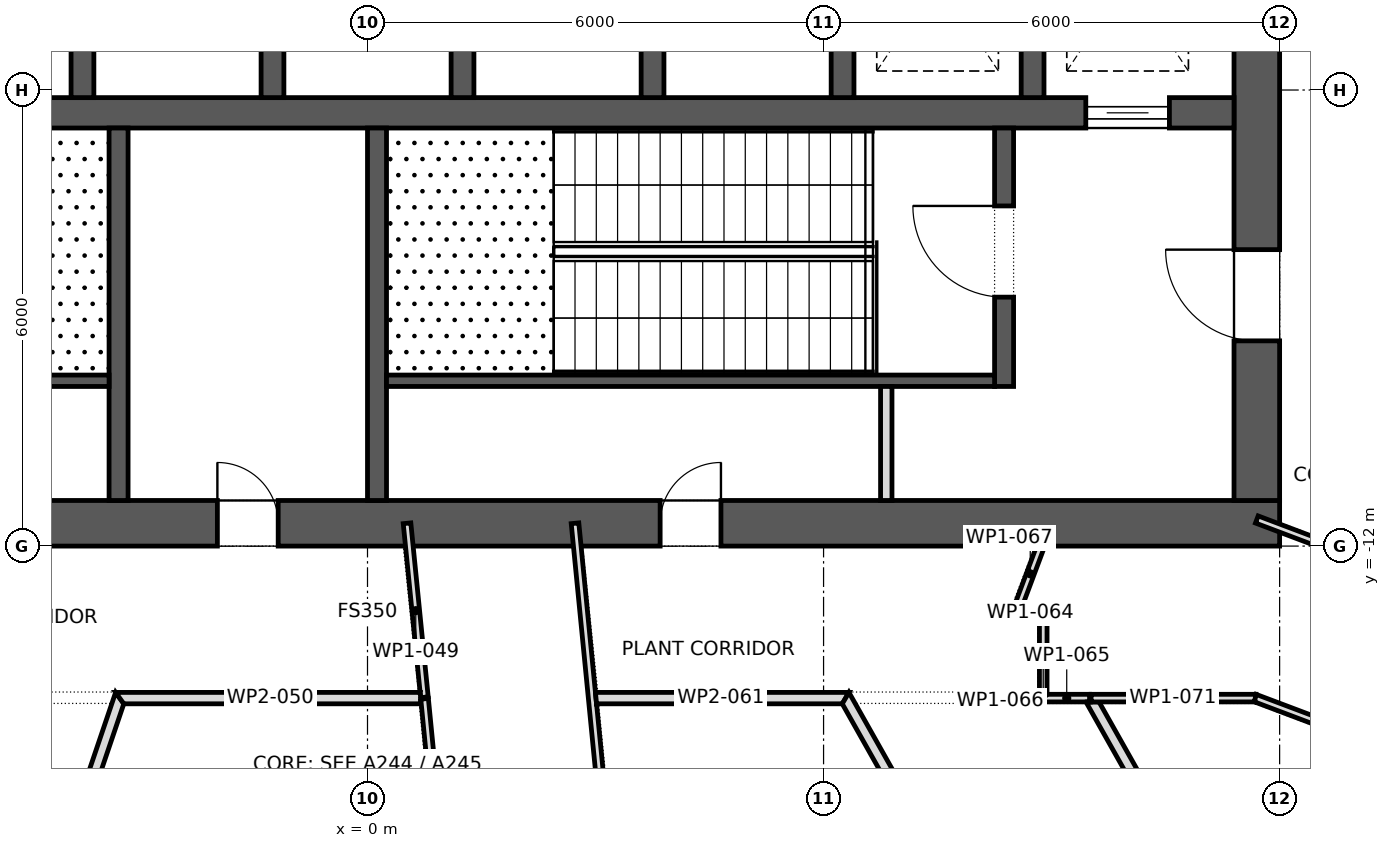
"""IFC4 building model, lengths in metres.
Left out: names, types, materials, properties, quantities, classifications, styles, units other than length and angle.
Written with IfcOpenShell. Run it as: python <this file> out.ifc"""

import sys

from ifc_helpers import new_model, si_unit, direction, frame, frame_2d, origin, place, context, subcontext, project, spatial, polyline, rectangle, outline, extrude, element, fill, save


model = new_model("IFC4")
c1 = context("Model", 3, precision=1e-05, world=origin(), true_north=direction((0.0, 1.0)))
c2 = subcontext(c1, "Body", "Model", "MODEL_VIEW")
j1 = project(units=[si_unit("LENGTHUNIT", "METRE"), si_unit("PLANEANGLEUNIT", "RADIAN")], contexts=[c1])
p1 = place(None, origin())
s1 = spatial("IfcSite", under=j1, at=p1, CompositionType="ELEMENT")
p2 = place(p1, origin())
s2 = spatial("IfcBuilding", under=s1, at=p2, CompositionType="ELEMENT")
p3 = place(p2, frame((0.0, 0.0, 173.5)))
s3 = spatial("IfcBuildingStorey", under=s2, at=p3, CompositionType="ELEMENT", Elevation=173.5)
p4 = place(p3, frame((-12.0, -11.7, 0.0), z_axis=(0.0, 0.0, 1.0), x_axis=(1.0, 0.0, 0.0)))
e1 = element("IfcWall", 1, at=p4, inside=s3, PredefinedType="SHEAR", context=c2, shape_type="SweptSolid", body=[
    extrude(rectangle(XDim=24.0, YDim=0.6, at=frame_2d((12.0, 0.0))), origin(), (0.0, 0.0, 1.0), 5.4),
])
p5 = place(p4, frame((10.025, 0.0, 0.0)))
e2 = element("IfcOpeningElement", 2, at=p5, cuts=e1, PredefinedType="OPENING", context=c2, shape_type="SweptSolid", body=[
    extrude(rectangle(XDim=0.8, YDim=2.1, at=frame_2d((0.4, 1.05))), frame((0.0, 0.312, 0.0), z_axis=(0.0, -1.0, 0.0), x_axis=(1.0, 0.0, 0.0)), (0.0, 0.0, 1.0), 0.624),
])
p6 = place(p4, frame((4.2, 0.0, 0.0)))
e3 = element("IfcOpeningElement", 3, at=p6, cuts=e1, PredefinedType="OPENING", context=c2, shape_type="SweptSolid", body=[
    extrude(rectangle(XDim=0.8, YDim=2.1, at=frame_2d((0.4, 1.05))), frame((0.0, 0.312, 0.0), z_axis=(0.0, -1.0, 0.0), x_axis=(1.0, 0.0, 0.0)), (0.0, 0.0, 1.0), 0.624),
])
p7 = place(p4, frame((15.85, 0.0, 0.0)))
e4 = element("IfcOpeningElement", 4, at=p7, cuts=e1, PredefinedType="OPENING", context=c2, shape_type="SweptSolid", body=[
    extrude(rectangle(XDim=0.8, YDim=2.1, at=frame_2d((0.4, 1.05))), frame((0.0, 0.312, 0.0), z_axis=(0.0, -1.0, 0.0), x_axis=(1.0, 0.0, 0.0)), (0.0, 0.0, 1.0), 0.624),
])
p8 = place(p3, frame((11.7, -11.4, 0.0), z_axis=(0.0, 0.0, 1.0), x_axis=(0.0, 1.0, 0.0)))
e5 = element("IfcWall", 5, at=p8, inside=s3, PredefinedType="SHEAR", context=c2, shape_type="SweptSolid", body=[
    extrude(rectangle(XDim=22.8, YDim=0.6, at=frame_2d((11.4, 0.0))), origin(), (0.0, 0.0, 1.0), 5.4),
])
p9 = place(p8, frame((10.2, 0.0, 0.0)))
e6 = element("IfcOpeningElement", 6, at=p9, cuts=e5, PredefinedType="OPENING", context=c2, shape_type="SweptSolid", body=[
    extrude(rectangle(XDim=2.4, YDim=2.1, at=frame_2d((1.2, 1.05))), frame((0.0, 0.312, 0.0), z_axis=(0.0, -1.0, 0.0), x_axis=(1.0, 0.0, 0.0)), (0.0, 0.0, 1.0), 0.624),
])
p10 = place(p8, frame((19.5, 0.0, 0.0)))
e7 = element("IfcOpeningElement", 7, at=p10, cuts=e5, PredefinedType="OPENING", context=c2, shape_type="SweptSolid", body=[
    extrude(rectangle(XDim=1.2, YDim=2.1, at=frame_2d((0.6, 1.05))), frame((0.0, 0.312, 0.0), z_axis=(0.0, -1.0, 0.0), x_axis=(1.0, 0.0, 0.0)), (0.0, 0.0, 1.0), 0.624),
])
p11 = place(p8, frame((2.1, 0.0, 0.0)))
e8 = element("IfcOpeningElement", 8, at=p11, cuts=e5, PredefinedType="OPENING", context=c2, shape_type="SweptSolid", body=[
    extrude(rectangle(XDim=1.2, YDim=2.1, at=frame_2d((0.6, 1.05))), frame((0.0, 0.312, 0.0), z_axis=(0.0, -1.0, 0.0), x_axis=(1.0, 0.0, 0.0)), (0.0, 0.0, 1.0), 0.624),
])
p12 = place(p3, frame((-11.4, -6.3, 0.0), z_axis=(0.0, 0.0, 1.0), x_axis=(1.0, 0.0, 0.0)))
e9 = element("IfcWall", 9, at=p12, inside=s3, PredefinedType="SHEAR", context=c2, shape_type="SweptSolid", body=[
    extrude(rectangle(XDim=22.8, YDim=0.4, at=frame_2d((11.4, 0.0))), origin(), (0.0, 0.0, 1.0), 5.4),
])
p13 = place(p12, frame((20.85, 0.0, 0.0)))
e10 = element("IfcOpeningElement", 10, at=p13, cuts=e9, PredefinedType="OPENING", context=c2, shape_type="SweptSolid", body=[
    extrude(rectangle(XDim=1.1, YDim=2.1, at=frame_2d((0.55, 1.05))), frame((0.0, 0.212, 0.0), z_axis=(0.0, -1.0, 0.0), x_axis=(1.0, 0.0, 0.0)), (0.0, 0.0, 1.0), 0.424),
])
for number, where, z_axis, x_axis in (
    (11, (-3.75, -6.1, 0.0), (0.0, 0.0, 1.0), (0.0, 1.0, 0.0)),
    (12, (-1.25, -6.1, 0.0), (0.0, 0.0, 1.0), (0.0, 1.0, 0.0)),
    (13, (1.25, -6.1, 0.0), (0.0, 0.0, 1.0), (0.0, 1.0, 0.0)),
    (14, (3.75, -6.1, 0.0), (0.0, 0.0, 1.0), (0.0, 1.0, 0.0)),
    (15, (6.25, -6.1, 0.0), (0.0, 0.0, 1.0), (0.0, 1.0, 0.0)),
    (16, (8.75, -6.1, 0.0), (0.0, 0.0, 1.0), (0.0, 1.0, 0.0)),
):
    element("IfcWall", number, at=place(p3, frame(where, z_axis=z_axis, x_axis=x_axis)), inside=s3, PredefinedType="SHEAR", context=c2, shape_type="SweptSolid", body=[
        extrude(rectangle(XDim=2.9, YDim=0.3, at=frame_2d((1.45, 0.0))), origin(), (0.0, 0.0, 1.0), 5.4),
    ])
for number, where, z_axis, x_axis in (
    (17, (-3.275, -11.4, 0.0), (0.0, 0.0, 1.0), (0.0, 1.0, 0.0)),
    (18, (0.125, -11.4, 0.0), (0.0, 0.0, 1.0), (0.0, 1.0, 0.0)),
):
    element("IfcWall", number, at=place(p3, frame(where, z_axis=z_axis, x_axis=x_axis)), inside=s3, PredefinedType="SHEAR", context=c2, shape_type="SweptSolid", body=[
        extrude(rectangle(XDim=4.9, YDim=0.25, at=frame_2d((2.45, 0.0))), origin(), (0.0, 0.0, 1.0), 5.1),
    ])
p14 = place(p3, frame((8.375, -9.9, 0.0), z_axis=(0.0, 0.0, 1.0), x_axis=(0.0, 1.0, 0.0)))
e19 = element("IfcWall", 19, at=p14, inside=s3, PredefinedType="SHEAR", context=c2, shape_type="SweptSolid", body=[
    extrude(rectangle(XDim=3.4, YDim=0.25, at=frame_2d((1.7, 0.0))), origin(), (0.0, 0.0, 1.0), 5.1),
])
p15 = place(p14, frame((1.175, 0.0, 0.0)))
e20 = element("IfcOpeningElement", 20, at=p15, cuts=e19, PredefinedType="OPENING", context=c2, shape_type="SweptSolid", body=[
    extrude(rectangle(XDim=1.2, YDim=2.1, at=frame_2d((0.6, 1.05))), frame((0.0, 0.137, 0.0), z_axis=(0.0, -1.0, 0.0), x_axis=(1.0, 0.0, 0.0)), (0.0, 0.0, 1.0), 0.274),
])
for number, where, z_axis, x_axis in (
    (21, (-11.4, -9.825, 0.0), (0.0, 0.0, 1.0), (1.0, 0.0, 0.0)),
    (22, (0.25, -9.825, 0.0), (0.0, 0.0, 1.0), (1.0, 0.0, 0.0)),
):
    element("IfcWall", number, at=place(p3, frame(where, z_axis=z_axis, x_axis=x_axis)), inside=s3, PredefinedType="SHEAR", context=c2, shape_type="SweptSolid", body=[
        extrude(rectangle(XDim=8.0, YDim=0.15, at=frame_2d((4.0, 0.0))), origin(), (0.0, 0.0, 1.0), 5.1),
    ])
p16 = place(p3, frame((6.825, -11.4, 0.0), z_axis=(0.0, 0.0, 1.0), x_axis=(0.0, 1.0, 0.0)))
e23 = element("IfcWall", 23, at=p16, inside=s3, PredefinedType="PARTITIONING", context=c2, shape_type="SweptSolid", body=[
    extrude(rectangle(XDim=1.5, YDim=0.15, at=frame_2d((0.75, 0.0))), origin(), (0.0, 0.0, 1.0), 5.1),
])
p17 = place(p3, frame((-3.243, -13.949, 0.0), z_axis=(0.0, 0.0, 1.0), x_axis=(-0.320918229821, -0.947106905142, 0.0)))
e24 = element("IfcWall", 24, at=p17, inside=s3, PredefinedType="PARTITIONING", context=c2, shape_type="SweptSolid", body=[
    extrude(outline(polyline([(12.326, -0.075), (12.326, -0.075), (12.15, 0.075), (10.43, 0.075), (8.71, 0.075), (6.989, 0.075), (5.269, 0.075), (3.548, 0.075), (1.828, 0.075), (0.107, 0.075), (0.0, -0.075), (0.0, -0.075), (1.761, -0.075), (3.522, -0.075), (5.282, -0.075), (7.043, -0.075), (8.804, -0.075), (10.565, -0.075), (12.326, -0.075)])), origin(), (0.0, 0.0, 1.0), 5.1),
])
p18 = place(p17, frame((5.646, 0.0, 0.0)))
e25 = element("IfcOpeningElement", 25, at=p18, cuts=e24, PredefinedType="OPENING", context=c2, shape_type="SweptSolid", body=[
    extrude(rectangle(XDim=1.0, YDim=2.1, at=frame_2d((0.5, 1.05))), frame((0.0, 0.087, 0.0), z_axis=(0.0, -1.0, 0.0), x_axis=(1.0, 0.0, 0.0)), (0.0, 0.0, 1.0), 0.174),
])
p19 = place(p3, frame((0.52, -11.7, 0.0), z_axis=(0.0, 0.0, 1.0), x_axis=(0.099535104197, -0.995034051192, 0.0)))
e26 = element("IfcWall", 26, at=p19, inside=s3, PredefinedType="PARTITIONING", context=c2, shape_type="SweptSolid", body=[
    extrude(outline(polyline([(0.0, -0.05), (2.231, -0.05), (2.231, -0.05), (2.233, -0.05), (2.311, -0.05), (2.311, -0.006), (2.311, 0.05), (0.0, 0.05), (0.0, -0.05)])), origin(), (0.0, 0.0, 1.0), 5.1),
])
p20 = place(p3, frame((0.707, -14.0, 0.0), z_axis=(0.0, 0.0, 1.0), x_axis=(-1.0, 0.0, 0.0)))
e27 = element("IfcWall", 27, at=p20, inside=s3, PredefinedType="PARTITIONING", context=c2, shape_type="SweptSolid", body=[
    extrude(outline(polyline([(4.021, -0.075), (4.021, -0.075), (3.967, 0.0), (3.913, 0.075), (1.957, 0.075), (0.0, 0.075), (0.0, 0.074), (0.007, 0.004), (0.007, 0.004), (0.015, -0.075), (1.35, -0.075), (2.685, -0.075), (4.021, -0.075)])), origin(), (0.0, 0.0, 1.0), 5.1),
])
p21 = place(p3, frame((0.75, -13.999, 0.0), z_axis=(0.0, 0.0, 1.0), x_axis=(0.097559905923, -0.995229654279, 0.0)))
e28 = element("IfcWall", 28, at=p21, inside=s3, PredefinedType="PARTITIONING", context=c2, shape_type="SweptSolid", body=[
    extrude(rectangle(XDim=12.35, YDim=0.1, at=frame_2d((6.175, 0.0))), origin(), (0.0, 0.0, 1.0), 5.1),
])
p22 = place(p3, frame((2.73, -11.7, 0.0), z_axis=(0.0, 0.0, 1.0), x_axis=(0.09772373037, -0.99521358136, 0.0)))
e29 = element("IfcWall", 29, at=p22, inside=s3, PredefinedType="PARTITIONING", context=c2, shape_type="SweptSolid", body=[
    extrude(outline(polyline([(14.383, -0.05), (14.383, -0.049), (14.379, -0.004), (14.383, -0.003), (14.383, -0.003), (14.354, -0.005), (14.35, 0.05), (12.357, 0.05), (10.364, 0.05), (8.371, 0.05), (6.378, 0.05), (4.385, 0.05), (2.391, 0.05), (2.391, 0.049), (2.381, 0.05), (0.0, 0.05), (0.0, -0.05), (1.798, -0.05), (3.596, -0.05), (5.394, -0.05), (7.191, -0.05), (8.989, -0.05), (10.787, -0.05), (12.585, -0.05), (14.383, -0.05)])), origin(), (0.0, 0.0, 1.0), 5.1),
])
p23 = place(p3, frame((6.334, -14.0, 0.0), z_axis=(0.0, 0.0, 1.0), x_axis=(-1.0, 0.0, 0.0)))
e30 = element("IfcWall", 30, at=p23, inside=s3, PredefinedType="PARTITIONING", context=c2, shape_type="SweptSolid", body=[
    extrude(outline(polyline([(3.335, -0.075), (3.335, -0.072), (3.32, 0.075), (1.704, 0.075), (0.087, 0.075), (0.044, 0.0), (0.0, -0.075), (0.0, -0.075), (1.667, -0.075), (3.335, -0.075)])), origin(), (0.0, 0.0, 1.0), 5.1),
])
p24 = place(p3, frame((8.504, -12.802, 0.0), z_axis=(0.0, 0.0, 1.0), x_axis=(0.933934171126, -0.357445050326, 0.0)))
e31 = element("IfcWall", 31, at=p24, inside=s3, PredefinedType="PARTITIONING", context=c2, shape_type="SweptSolid", body=[
    extrude(outline(polyline([(0.0, -0.05), (0.379, -0.05), (0.448, 0.05), (0.099, 0.05), (0.0, -0.05)])), origin(), (0.0, 0.0, 1.0), 5.1),
])
p25 = place(p3, frame((8.84, -14.0, 0.0), z_axis=(0.0, 0.0, 1.0), x_axis=(1.0, 0.0, 0.0)))
e32 = element("IfcWall", 32, at=p25, inside=s3, PredefinedType="PARTITIONING", context=c2, shape_type="SweptSolid", body=[
    extrude(outline(polyline([(0.669, 0.05), (0.1, 0.05), (0.0, -0.05), (0.0, -0.05), (0.669, -0.05), (0.669, 0.05)])), origin(), (0.0, 0.0, 1.0), 5.1),
])
p26 = place(p3, frame((8.89, -12.916, 0.0), z_axis=(0.0, 0.0, 1.0), x_axis=(0.0, -1.0, 0.0)))
e33 = element("IfcWall", 33, at=p26, inside=s3, PredefinedType="PARTITIONING", context=c2, shape_type="SweptSolid", body=[
    extrude(outline(polyline([(1.135, -0.05), (1.135, -0.05), (1.034, 0.05), (0.0, 0.05), (0.069, -0.05), (1.135, -0.05)])), origin(), (0.0, 0.0, 1.0), 5.1),
])
p27 = place(p3, frame((8.89, -11.91, 0.0), z_axis=(0.0, 0.0, 1.0), x_axis=(-0.349812924814, -0.936819575817, 0.0)))
e34 = element("IfcWall", 34, at=p27, inside=s3, PredefinedType="PARTITIONING", context=c2, shape_type="SweptSolid", body=[
    extrude(outline(polyline([(1.021, -0.05), (1.021, -0.05), (0.922, 0.05), (0.0, 0.05), (0.0, -0.05), (1.021, -0.05)])), origin(), (0.0, 0.0, 1.0), 5.1),
])
p28 = place(p3, frame((9.518, -14.014, 0.0), z_axis=(0.0, 0.0, 1.0), x_axis=(0.490856680629, -0.871240333709, 0.0)))
e35 = element("IfcWall", 35, at=p28, inside=s3, PredefinedType="PARTITIONING", context=c2, shape_type="SweptSolid", body=[
    extrude(outline(polyline([(0.0, -0.075), (1.781, -0.075), (3.562, -0.075), (5.343, -0.075), (7.123, -0.075), (8.904, -0.075), (10.685, -0.075), (10.626, -0.017), (10.534, 0.075), (8.792, 0.075), (7.051, 0.075), (5.309, 0.075), (3.567, 0.075), (1.826, 0.075), (0.084, 0.075), (0.028, -0.024), (0.0, -0.009), (0.0, -0.009), (0.028, -0.025), (0.0, -0.074), (0.0, -0.075)])), origin(), (0.0, 0.0, 1.0), 5.1),
])
p29 = place(p3, frame((9.51, -14.0, 0.0), z_axis=(0.0, 0.0, 1.0), x_axis=(1.0, 0.0, 0.0)))
e36 = element("IfcWall", 36, at=p29, inside=s3, PredefinedType="PARTITIONING", context=c2, shape_type="SweptSolid", body=[
    extrude(outline(polyline([(0.0, -0.05), (2.161, -0.05), (2.179, 0.05), (0.0, 0.05), (0.0, -0.05)])), origin(), (0.0, 0.0, 1.0), 5.1),
])
p30 = place(p3, frame((11.671, -13.997, 0.0), z_axis=(0.0, 0.0, 1.0), x_axis=(0.935692249909, -0.352817252215, 0.0)))
e37 = element("IfcWall", 37, at=p30, inside=s3, PredefinedType="PARTITIONING", context=c2, shape_type="SweptSolid", body=[
    extrude(outline(polyline([(0.018, -0.05), (1.925, -0.05), (3.832, -0.05), (5.739, -0.05), (7.646, -0.05), (9.553, -0.05), (11.46, -0.05), (11.507, 0.036), (11.529, 0.024), (11.543, 0.049), (11.543, 0.05), (9.619, 0.05), (7.695, 0.05), (5.771, 0.05), (3.848, 0.05), (1.924, 0.05), (0.0, 0.05), (0.009, 0.0), (0.018, -0.05), (0.018, -0.05), (0.018, -0.05)])), origin(), (0.0, 0.0, 1.0), 5.1),
])
p31 = place(p3, frame((11.7, -11.65, 0.0), z_axis=(0.0, 0.0, 1.0), x_axis=(0.935630078932, -0.352982089343, 0.0)))
e38 = element("IfcWall", 38, at=p31, inside=s3, PredefinedType="PARTITIONING", context=c2, shape_type="SweptSolid", body=[
    extrude(rectangle(XDim=10.461, YDim=0.1, at=frame_2d((5.23, 0.0))), origin(), (0.0, 0.0, 1.0), 5.1),
])
p32 = place(p3, frame((12.074, -24.258, 0.0), z_axis=(0.0, 0.0, 1.0), x_axis=(-0.491143591973, 0.87107862565, 0.0)))
e39 = element("IfcWall", 39, at=p32, inside=s3, PredefinedType="PARTITIONING", context=c2, shape_type="SweptSolid", body=[
    extrude(outline(polyline([(0.0, -0.075), (1.97, -0.075), (3.94, -0.075), (5.91, -0.075), (7.88, -0.075), (9.85, -0.075), (11.82, -0.075), (11.732, 0.075), (9.807, 0.075), (7.881, 0.075), (5.955, 0.075), (4.03, 0.075), (2.104, 0.075), (0.178, 0.075), (0.0, -0.075)])), origin(), (0.0, 0.0, 1.0), 5.1),
])
p33 = place(p32, frame((5.433, 0.0, 0.0)))
e40 = element("IfcOpeningElement", 40, at=p33, cuts=e39, PredefinedType="OPENING", context=c2, shape_type="SweptSolid", body=[
    extrude(rectangle(XDim=1.0, YDim=2.1, at=frame_2d((0.5, 1.05))), frame((0.0, 0.087, 0.0), z_axis=(0.0, -1.0, 0.0), x_axis=(1.0, 0.0, 0.0)), (0.0, 0.0, 1.0), 0.174),
])
p34 = place(p13, origin())
e41 = element("IfcDoor", 41, at=p34, inside=s3, OperationType="SLIDING_TO_LEFT", PredefinedType="DOOR", context=c2, shape_type="SweptSolid", body=[
    extrude(rectangle(XDim=1.1, YDim=2.1, at=frame_2d((0.55, 1.05))), frame((0.0, 0.025, 0.0), z_axis=(0.0, -1.0, 0.0), x_axis=(1.0, 0.0, 0.0)), (0.0, 0.0, 1.0), 0.05),
])
fill(e10, e41)
p35 = place(p15, origin())
e42 = element("IfcDoor", 42, at=p35, inside=s3, OperationType="SINGLE_SWING_LEFT", PredefinedType="DOOR", context=c2, shape_type="SweptSolid", body=[
    extrude(rectangle(XDim=1.2, YDim=2.1, at=frame_2d((0.6, 1.05))), frame((0.0, 0.025, 0.0), z_axis=(0.0, -1.0, 0.0), x_axis=(1.0, 0.0, 0.0)), (0.0, 0.0, 1.0), 0.05),
])
fill(e20, e42)
p36 = place(p11, origin())
e43 = element("IfcDoor", 43, at=p36, inside=s3, OperationType="SINGLE_SWING_LEFT", PredefinedType="DOOR", context=c2, shape_type="SweptSolid", body=[
    extrude(rectangle(XDim=1.2, YDim=2.1, at=frame_2d((0.6, 1.05))), frame((0.0, 0.025, 0.0), z_axis=(0.0, -1.0, 0.0), x_axis=(1.0, 0.0, 0.0)), (0.0, 0.0, 1.0), 0.05),
])
fill(e8, e43)
p37 = place(p5, origin())
e44 = element("IfcDoor", 44, at=p37, inside=s3, OperationType="SINGLE_SWING_RIGHT", PredefinedType="DOOR", context=c2, shape_type="SweptSolid", body=[
    extrude(rectangle(XDim=0.8, YDim=2.1, at=frame_2d((0.4, 1.05))), frame((0.0, 0.025, 0.0), z_axis=(0.0, -1.0, 0.0), x_axis=(1.0, 0.0, 0.0)), (0.0, 0.0, 1.0), 0.05),
])
fill(e2, e44)
p38 = place(p7, origin())
e45 = element("IfcDoor", 45, at=p38, inside=s3, OperationType="SINGLE_SWING_LEFT", PredefinedType="DOOR", context=c2, shape_type="SweptSolid", body=[
    extrude(rectangle(XDim=0.8, YDim=2.1, at=frame_2d((0.4, 1.05))), frame((0.0, 0.025, 0.0), z_axis=(0.0, -1.0, 0.0), x_axis=(1.0, 0.0, 0.0)), (0.0, 0.0, 1.0), 0.05),
])
fill(e4, e45)
save(model, sys.argv[1])
